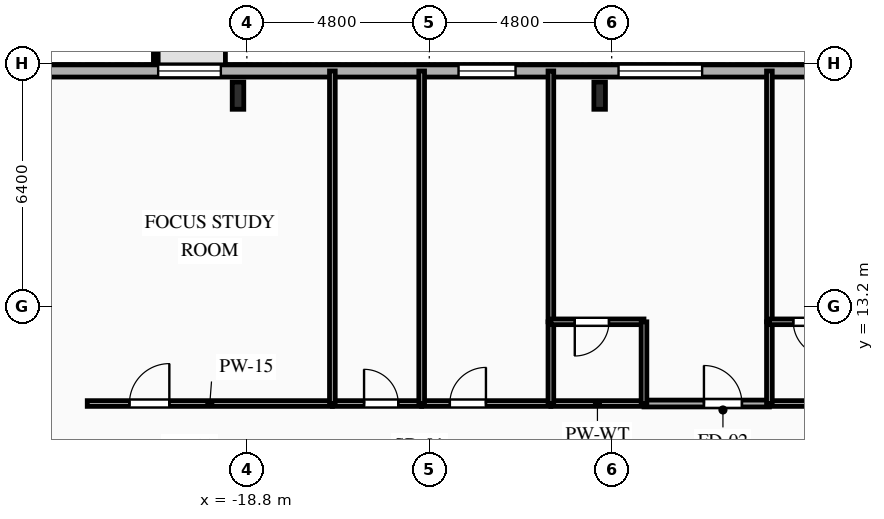
"""IFC4 building model, lengths in metres.
Left out: names, types, materials, properties, quantities, classifications, styles, units other than length and angle.
Written with IfcOpenShell. Run it as: python <this file> out.ifc"""

import sys

from ifc_helpers import new_model, si_unit, direction, frame, frame_2d, origin, origin_2d, place, context, subcontext, project, spatial, rectangle, i_section, extrude, element, fill, save


model = new_model("IFC4")
c1 = context("Model", 3, precision=1e-05, world=origin(), true_north=direction((0.0, 1.0)))
c2 = subcontext(c1, "Body", "Model", "MODEL_VIEW")
j1 = project(units=[si_unit("LENGTHUNIT", "METRE"), si_unit("PLANEANGLEUNIT", "RADIAN")], contexts=[c1])
p1 = place(None, origin())
s1 = spatial("IfcSite", under=j1, at=p1, CompositionType="ELEMENT")
p2 = place(p1, origin())
s2 = spatial("IfcBuilding", under=s1, at=p2, CompositionType="ELEMENT")
p3 = place(p2, frame((0.0, 0.0, 53.8)))
s3 = spatial("IfcBuildingStorey", under=s2, at=p3, CompositionType="ELEMENT", Elevation=53.8)
for number, where, z_axis, x_axis in (
    (1, (-9.517, 18.75, 0.0), (0.0, 0.0, 1.0), (1.0, 0.0, 0.0)),
    (2, (-19.033, 18.75, 0.0), (0.0, 0.0, 1.0), (1.0, 0.0, 0.0)),
):
    element("IfcColumn", number, at=place(p3, frame(where, z_axis=z_axis, x_axis=x_axis)), inside=s3, PredefinedType="COLUMN", context=c2, shape_type="SweptSolid", body=[
        extrude(i_section(OverallWidth=0.304, OverallDepth=0.716, WebThickness=0.021, FlangeThickness=0.04, FilletRadius=0.027, at=origin_2d()), origin(), (0.0, 0.0, 1.0), 3.35),
    ])
p4 = place(p3, frame((-29.2, 19.4, 0.0), z_axis=(0.0, 0.0, 1.0), x_axis=(1.0, 0.0, 0.0)))
e3 = element("IfcWall", 3, at=p4, inside=s3, PredefinedType="SOLIDWALL", context=c2, shape_type="SweptSolid", body=[
    extrude(rectangle(XDim=58.4, YDim=0.32, at=frame_2d((29.2, 0.0))), origin(), (0.0, 0.0, 1.0), 3.035),
])
p5 = place(p4, frame((8.065, 0.0, 0.85)))
e4 = element("IfcOpeningElement", 4, at=p5, cuts=e3, PredefinedType="OPENING", context=c2, shape_type="SweptSolid", body=[
    extrude(rectangle(XDim=1.65, YDim=1.85, at=frame_2d((0.825, 0.925))), frame((0.0, 0.17, 0.0), z_axis=(0.0, -1.0, 0.0), x_axis=(1.0, 0.0, 0.0)), (0.0, 0.0, 1.0), 0.34),
])
p6 = place(p4, frame((15.97, 0.0, 0.85)))
e5 = element("IfcOpeningElement", 5, at=p6, cuts=e3, PredefinedType="OPENING", context=c2, shape_type="SweptSolid", body=[
    extrude(rectangle(XDim=1.5, YDim=1.85, at=frame_2d((0.75, 0.925))), frame((0.0, 0.17, 0.0), z_axis=(0.0, -1.0, 0.0), x_axis=(1.0, 0.0, 0.0)), (0.0, 0.0, 1.0), 0.34),
])
p7 = place(p4, frame((20.18, 0.0, 0.85)))
e6 = element("IfcOpeningElement", 6, at=p7, cuts=e3, PredefinedType="OPENING", context=c2, shape_type="SweptSolid", body=[
    extrude(rectangle(XDim=2.2, YDim=1.85, at=frame_2d((1.1, 0.925))), frame((0.0, 0.17, 0.0), z_axis=(0.0, -1.0, 0.0), x_axis=(1.0, 0.0, 0.0)), (0.0, 0.0, 1.0), 0.34),
])
p8 = place(p4, frame((25.94, 0.0, 0.85)))
e7 = element("IfcOpeningElement", 7, at=p8, cuts=e3, PredefinedType="OPENING", context=c2, shape_type="SweptSolid", body=[
    extrude(rectangle(XDim=2.2, YDim=1.85, at=frame_2d((1.1, 0.925))), frame((0.0, 0.17, 0.0), z_axis=(0.0, -1.0, 0.0), x_axis=(1.0, 0.0, 0.0)), (0.0, 0.0, 1.0), 0.34),
])
p9 = place(p4, frame((31.7, 0.0, 0.85)))
e8 = element("IfcOpeningElement", 8, at=p9, cuts=e3, PredefinedType="OPENING", context=c2, shape_type="SweptSolid", body=[
    extrude(rectangle(XDim=2.2, YDim=1.85, at=frame_2d((1.1, 0.925))), frame((0.0, 0.17, 0.0), z_axis=(0.0, -1.0, 0.0), x_axis=(1.0, 0.0, 0.0)), (0.0, 0.0, 1.0), 0.34),
])
p10 = place(p4, frame((36.056, 0.0, 0.85)))
e9 = element("IfcOpeningElement", 9, at=p10, cuts=e3, PredefinedType="OPENING", context=c2, shape_type="SweptSolid", body=[
    extrude(rectangle(XDim=2.2, YDim=1.85, at=frame_2d((1.1, 0.925))), frame((0.0, 0.17, 0.0), z_axis=(0.0, -1.0, 0.0), x_axis=(1.0, 0.0, 0.0)), (0.0, 0.0, 1.0), 0.34),
])
p11 = place(p4, frame((43.22, 0.0, 0.85)))
e10 = element("IfcOpeningElement", 10, at=p11, cuts=e3, PredefinedType="OPENING", context=c2, shape_type="SweptSolid", body=[
    extrude(rectangle(XDim=2.2, YDim=1.85, at=frame_2d((1.1, 0.925))), frame((0.0, 0.17, 0.0), z_axis=(0.0, -1.0, 0.0), x_axis=(1.0, 0.0, 0.0)), (0.0, 0.0, 1.0), 0.34),
])
p12 = place(p4, frame((48.895, 0.0, 0.85)))
e11 = element("IfcOpeningElement", 11, at=p12, cuts=e3, PredefinedType="OPENING", context=c2, shape_type="SweptSolid", body=[
    extrude(rectangle(XDim=1.65, YDim=1.85, at=frame_2d((0.825, 0.925))), frame((0.0, 0.17, 0.0), z_axis=(0.0, -1.0, 0.0), x_axis=(1.0, 0.0, 0.0)), (0.0, 0.0, 1.0), 0.34),
])
p13 = place(p3, frame((-23.0, 10.65, 0.0), z_axis=(0.0, 0.0, 1.0), x_axis=(1.0, 0.0, 0.0)))
e12 = element("IfcWall", 12, at=p13, inside=s3, PredefinedType="PARTITIONING", context=c2, shape_type="SweptSolid", body=[
    extrude(rectangle(XDim=6.45, YDim=0.15, at=frame_2d((3.225, 0.0))), origin(), (0.0, 0.0, 1.0), 3.035),
])
p14 = place(p13, frame((1.11, 0.0, 0.0)))
e13 = element("IfcOpeningElement", 13, at=p14, cuts=e12, PredefinedType="OPENING", context=c2, shape_type="SweptSolid", body=[
    extrude(rectangle(XDim=1.05, YDim=2.15, at=frame_2d((0.525, 1.075))), frame((0.0, 0.085, 0.0), z_axis=(0.0, -1.0, 0.0), x_axis=(1.0, 0.0, 0.0)), (0.0, 0.0, 1.0), 0.17),
])
p15 = place(p3, frame((-16.55, 10.65, 0.0), z_axis=(0.0, 0.0, 1.0), x_axis=(1.0, 0.0, 0.0)))
e14 = element("IfcWall", 14, at=p15, inside=s3, PredefinedType="PLUMBINGWALL", context=c2, shape_type="SweptSolid", body=[
    extrude(rectangle(XDim=2.35, YDim=0.15, at=frame_2d((1.175, 0.0))), origin(), (0.0, 0.0, 1.0), 3.035),
])
p16 = place(p15, frame((0.834, 0.0, 0.0)))
e15 = element("IfcOpeningElement", 15, at=p16, cuts=e14, PredefinedType="OPENING", context=c2, shape_type="SweptSolid", body=[
    extrude(rectangle(XDim=0.9, YDim=2.1, at=frame_2d((0.45, 1.05))), frame((0.0, 0.085, 0.0), z_axis=(0.0, -1.0, 0.0), x_axis=(1.0, 0.0, 0.0)), (0.0, 0.0, 1.0), 0.17),
])
p17 = place(p3, frame((-14.2, 10.65, 0.0), z_axis=(0.0, 0.0, 1.0), x_axis=(1.0, 0.0, 0.0)))
e16 = element("IfcWall", 16, at=p17, inside=s3, PredefinedType="PARTITIONING", context=c2, shape_type="SweptSolid", body=[
    extrude(rectangle(XDim=3.4, YDim=0.15, at=frame_2d((1.7, 0.0))), origin(), (0.0, 0.0, 1.0), 3.035),
])
p18 = place(p17, frame((0.741, 0.0, 0.0)))
e17 = element("IfcOpeningElement", 17, at=p18, cuts=e16, PredefinedType="OPENING", context=c2, shape_type="SweptSolid", body=[
    extrude(rectangle(XDim=0.95, YDim=2.1, at=frame_2d((0.475, 1.05))), frame((0.0, 0.085, 0.0), z_axis=(0.0, -1.0, 0.0), x_axis=(1.0, 0.0, 0.0)), (0.0, 0.0, 1.0), 0.17),
])
p19 = place(p3, frame((-8.35, 10.65, 0.0), z_axis=(0.0, 0.0, 1.0), x_axis=(1.0, 0.0, 0.0)))
e18 = element("IfcWall", 18, at=p19, inside=s3, PredefinedType="PARTITIONING", context=c2, shape_type="SweptSolid", body=[
    extrude(rectangle(XDim=3.3, YDim=0.18, at=frame_2d((1.65, 0.0))), origin(), (0.0, 0.0, 1.0), 3.035),
])
p20 = place(p19, frame((1.577, 0.0, 0.0)))
e19 = element("IfcOpeningElement", 19, at=p20, cuts=e18, PredefinedType="OPENING", context=c2, shape_type="SweptSolid", body=[
    extrude(rectangle(XDim=1.0, YDim=2.15, at=frame_2d((0.5, 1.075))), frame((0.0, 0.1, 0.0), z_axis=(0.0, -1.0, 0.0), x_axis=(1.0, 0.0, 0.0)), (0.0, 0.0, 1.0), 0.2),
])
for number, where, z_axis, x_axis in (
    (20, (-10.8, 10.65, 0.0), (0.0, 0.0, 1.0), (1.0, 0.0, 0.0)),
    (21, (-5.05, 10.65, 0.0), (0.0, 0.0, 1.0), (1.0, 0.0, 0.0)),
):
    element("IfcWall", number, at=place(p3, frame(where, z_axis=z_axis, x_axis=x_axis)), inside=s3, PredefinedType="PLUMBINGWALL", context=c2, shape_type="SweptSolid", body=[
        extrude(rectangle(XDim=2.45, YDim=0.15, at=frame_2d((1.225, 0.0))), origin(), (0.0, 0.0, 1.0), 3.035),
    ])
for number, where, z_axis, x_axis in (
    (22, (-16.55, 19.4, 0.0), (0.0, 0.0, 1.0), (0.0, -1.0, 0.0)),
    (23, (-14.2, 19.4, 0.0), (0.0, 0.0, 1.0), (0.0, -1.0, 0.0)),
):
    element("IfcWall", number, at=place(p3, frame(where, z_axis=z_axis, x_axis=x_axis)), inside=s3, PredefinedType="PLUMBINGWALL", context=c2, shape_type="SweptSolid", body=[
        extrude(rectangle(XDim=8.75, YDim=0.15, at=frame_2d((4.375, 0.0))), origin(), (0.0, 0.0, 1.0), 3.035),
    ])
p21 = place(p3, frame((-10.8, 19.4, 0.0), z_axis=(0.0, 0.0, 1.0), x_axis=(0.0, -1.0, 0.0)))
e24 = element("IfcWall", 24, at=p21, inside=s3, PredefinedType="PARTITIONING", context=c2, shape_type="SweptSolid", body=[
    extrude(rectangle(XDim=6.6, YDim=0.15, at=frame_2d((3.3, 0.0))), origin(), (0.0, 0.0, 1.0), 3.035),
])
p22 = place(p3, frame((-10.8, 12.8, 0.0), z_axis=(0.0, 0.0, 1.0), x_axis=(0.0, -1.0, 0.0)))
e25 = element("IfcWall", 25, at=p22, inside=s3, PredefinedType="PLUMBINGWALL", context=c2, shape_type="SweptSolid", body=[
    extrude(rectangle(XDim=2.15, YDim=0.15, at=frame_2d((1.075, 0.0))), origin(), (0.0, 0.0, 1.0), 3.035),
])
p23 = place(p3, frame((-8.35, 12.8, 0.0), z_axis=(0.0, 0.0, 1.0), x_axis=(-1.0, 0.0, 0.0)))
e26 = element("IfcWall", 26, at=p23, inside=s3, PredefinedType="PLUMBINGWALL", context=c2, shape_type="SweptSolid", body=[
    extrude(rectangle(XDim=2.45, YDim=0.15, at=frame_2d((1.225, 0.0))), origin(), (0.0, 0.0, 1.0), 3.035),
])
p24 = place(p23, frame((0.921, 0.0, 0.0)))
e27 = element("IfcOpeningElement", 27, at=p24, cuts=e26, PredefinedType="OPENING", context=c2, shape_type="SweptSolid", body=[
    extrude(rectangle(XDim=0.9, YDim=2.1, at=frame_2d((0.45, 1.05))), frame((0.0, 0.085, 0.0), z_axis=(0.0, -1.0, 0.0), x_axis=(1.0, 0.0, 0.0)), (0.0, 0.0, 1.0), 0.17),
])
p25 = place(p3, frame((-8.35, 10.65, 0.0), z_axis=(0.0, 0.0, 1.0), x_axis=(0.0, 1.0, 0.0)))
e28 = element("IfcWall", 28, at=p25, inside=s3, PredefinedType="PLUMBINGWALL", context=c2, shape_type="SweptSolid", body=[
    extrude(rectangle(XDim=2.15, YDim=0.15, at=frame_2d((1.075, 0.0))), origin(), (0.0, 0.0, 1.0), 3.035),
])
p26 = place(p3, frame((-5.05, 19.4, 0.0), z_axis=(0.0, 0.0, 1.0), x_axis=(0.0, -1.0, 0.0)))
e29 = element("IfcWall", 29, at=p26, inside=s3, PredefinedType="PARTITIONING", context=c2, shape_type="SweptSolid", body=[
    extrude(rectangle(XDim=6.6, YDim=0.15, at=frame_2d((3.3, 0.0))), origin(), (0.0, 0.0, 1.0), 3.035),
])
p27 = place(p3, frame((-5.05, 12.8, 0.0), z_axis=(0.0, 0.0, 1.0), x_axis=(0.0, -1.0, 0.0)))
e30 = element("IfcWall", 30, at=p27, inside=s3, PredefinedType="PLUMBINGWALL", context=c2, shape_type="SweptSolid", body=[
    extrude(rectangle(XDim=2.15, YDim=0.15, at=frame_2d((1.075, 0.0))), origin(), (0.0, 0.0, 1.0), 3.035),
])
p28 = place(p3, frame((-2.6, 12.8, 0.0), z_axis=(0.0, 0.0, 1.0), x_axis=(-1.0, 0.0, 0.0)))
e31 = element("IfcWall", 31, at=p28, inside=s3, PredefinedType="PLUMBINGWALL", context=c2, shape_type="SweptSolid", body=[
    extrude(rectangle(XDim=2.45, YDim=0.15, at=frame_2d((1.225, 0.0))), origin(), (0.0, 0.0, 1.0), 3.035),
])
p29 = place(p28, frame((0.921, 0.0, 0.0)))
e32 = element("IfcOpeningElement", 32, at=p29, cuts=e31, PredefinedType="OPENING", context=c2, shape_type="SweptSolid", body=[
    extrude(rectangle(XDim=0.9, YDim=2.1, at=frame_2d((0.45, 1.05))), frame((0.0, 0.085, 0.0), z_axis=(0.0, -1.0, 0.0), x_axis=(1.0, 0.0, 0.0)), (0.0, 0.0, 1.0), 0.17),
])
p30 = place(p5, origin())
e33 = element("IfcWindow", 33, at=p30, inside=s3, PartitioningType="SINGLE_PANEL", PredefinedType="WINDOW", context=c2, shape_type="SweptSolid", body=[
    extrude(rectangle(XDim=1.65, YDim=1.85, at=frame_2d((0.825, 0.925))), frame((0.0, 0.03, 0.0), z_axis=(0.0, -1.0, 0.0), x_axis=(1.0, 0.0, 0.0)), (0.0, 0.0, 1.0), 0.06),
])
fill(e4, e33)
p31 = place(p6, origin())
e34 = element("IfcWindow", 34, at=p31, inside=s3, PartitioningType="SINGLE_PANEL", PredefinedType="WINDOW", context=c2, shape_type="SweptSolid", body=[
    extrude(rectangle(XDim=1.5, YDim=1.85, at=frame_2d((0.75, 0.925))), frame((0.0, 0.03, 0.0), z_axis=(0.0, -1.0, 0.0), x_axis=(1.0, 0.0, 0.0)), (0.0, 0.0, 1.0), 0.06),
])
fill(e5, e34)
p32 = place(p7, origin())
e35 = element("IfcWindow", 35, at=p32, inside=s3, PartitioningType="SINGLE_PANEL", PredefinedType="WINDOW", context=c2, shape_type="SweptSolid", body=[
    extrude(rectangle(XDim=2.2, YDim=1.85, at=frame_2d((1.1, 0.925))), frame((0.0, 0.03, 0.0), z_axis=(0.0, -1.0, 0.0), x_axis=(1.0, 0.0, 0.0)), (0.0, 0.0, 1.0), 0.06),
])
fill(e6, e35)
p33 = place(p14, origin())
e36 = element("IfcDoor", 36, at=p33, inside=s3, OperationType="SINGLE_SWING_RIGHT", PredefinedType="DOOR", context=c2, shape_type="SweptSolid", body=[
    extrude(rectangle(XDim=1.05, YDim=2.15, at=frame_2d((0.525, 1.075))), frame((0.0, 0.025, 0.0), z_axis=(0.0, -1.0, 0.0), x_axis=(1.0, 0.0, 0.0)), (0.0, 0.0, 1.0), 0.05),
])
fill(e13, e36)
p34 = place(p16, origin())
e37 = element("IfcDoor", 37, at=p34, inside=s3, OperationType="SINGLE_SWING_LEFT", PredefinedType="DOOR", context=c2, shape_type="SweptSolid", body=[
    extrude(rectangle(XDim=0.9, YDim=2.1, at=frame_2d((0.45, 1.05))), frame((0.0, 0.025, 0.0), z_axis=(0.0, -1.0, 0.0), x_axis=(1.0, 0.0, 0.0)), (0.0, 0.0, 1.0), 0.05),
])
fill(e15, e37)
p35 = place(p18, origin())
e38 = element("IfcDoor", 38, at=p35, inside=s3, OperationType="SINGLE_SWING_RIGHT", PredefinedType="DOOR", context=c2, shape_type="SweptSolid", body=[
    extrude(rectangle(XDim=0.95, YDim=2.1, at=frame_2d((0.475, 1.05))), frame((0.0, 0.025, 0.0), z_axis=(0.0, -1.0, 0.0), x_axis=(1.0, 0.0, 0.0)), (0.0, 0.0, 1.0), 0.05),
])
fill(e17, e38)
p36 = place(p20, origin())
e39 = element("IfcDoor", 39, at=p36, inside=s3, OperationType="SINGLE_SWING_LEFT", PredefinedType="DOOR", context=c2, shape_type="SweptSolid", body=[
    extrude(rectangle(XDim=1.0, YDim=2.15, at=frame_2d((0.5, 1.075))), frame((0.0, 0.025, 0.0), z_axis=(0.0, -1.0, 0.0), x_axis=(1.0, 0.0, 0.0)), (0.0, 0.0, 1.0), 0.05),
])
fill(e19, e39)
p37 = place(p24, origin())
e40 = element("IfcDoor", 40, at=p37, inside=s3, OperationType="SINGLE_SWING_RIGHT", PredefinedType="DOOR", context=c2, shape_type="SweptSolid", body=[
    extrude(rectangle(XDim=0.9, YDim=2.1, at=frame_2d((0.45, 1.05))), frame((0.0, 0.025, 0.0), z_axis=(0.0, -1.0, 0.0), x_axis=(1.0, 0.0, 0.0)), (0.0, 0.0, 1.0), 0.05),
])
fill(e27, e40)
p38 = place(p29, origin())
e41 = element("IfcDoor", 41, at=p38, inside=s3, OperationType="SINGLE_SWING_LEFT", PredefinedType="DOOR", context=c2, shape_type="SweptSolid", body=[
    extrude(rectangle(XDim=0.9, YDim=2.1, at=frame_2d((0.45, 1.05))), frame((0.0, 0.025, 0.0), z_axis=(0.0, -1.0, 0.0), x_axis=(1.0, 0.0, 0.0)), (0.0, 0.0, 1.0), 0.05),
])
fill(e32, e41)
save(model, sys.argv[1])
